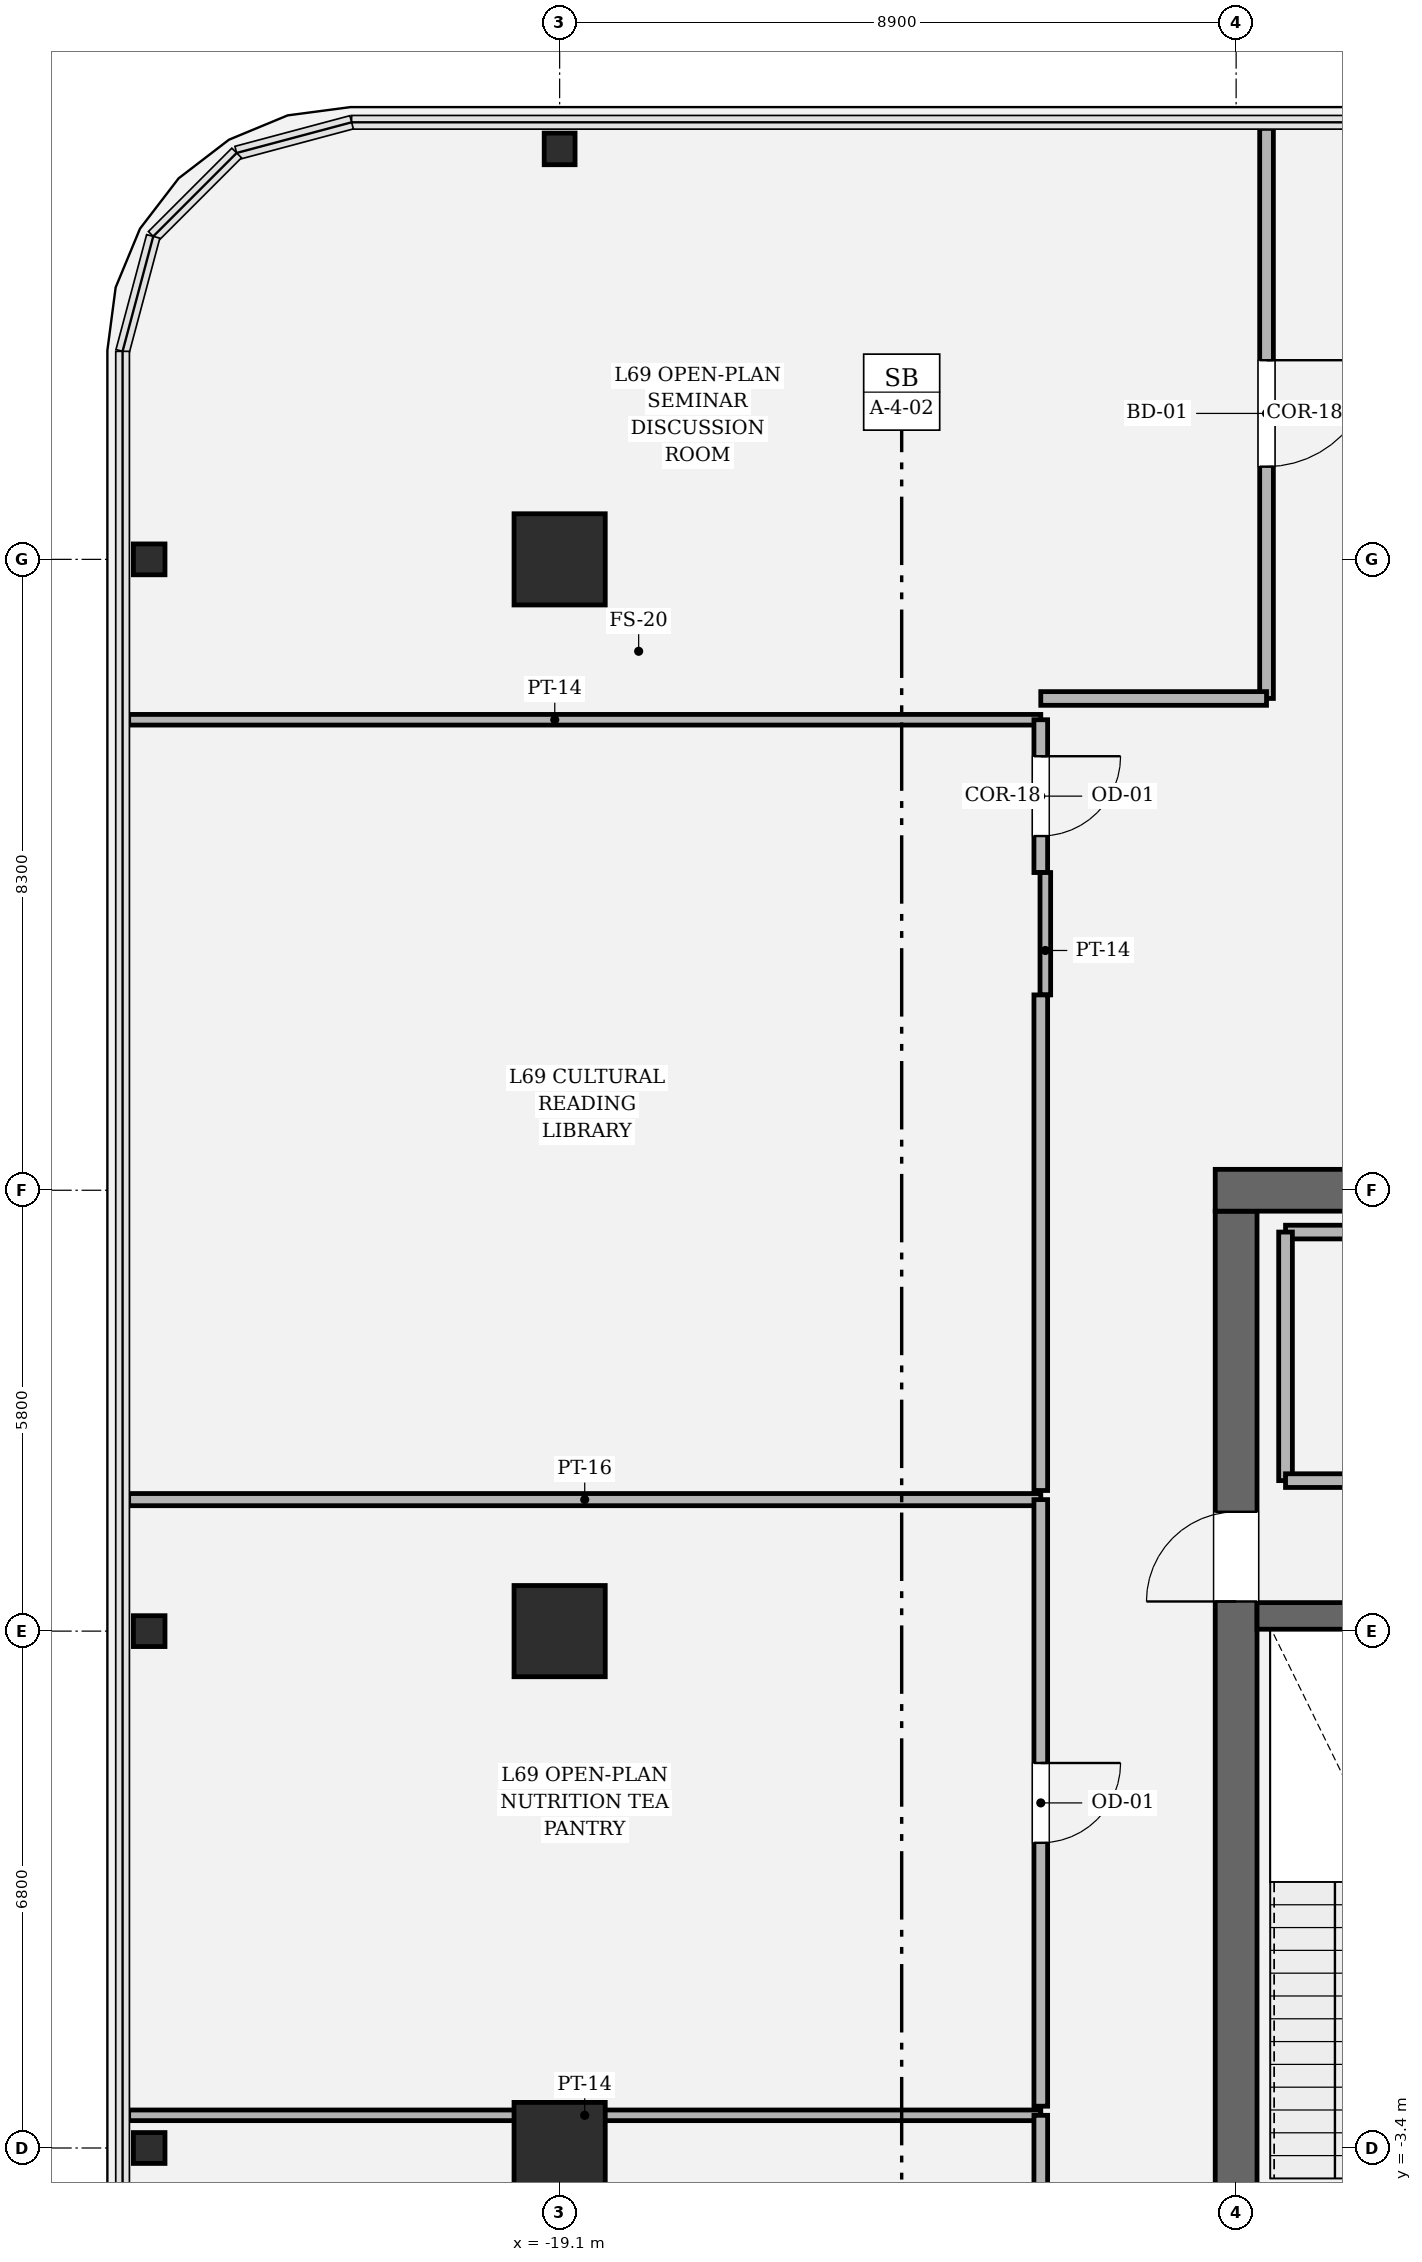
"""IFC4 building model, lengths in metres.
Left out: names, types, materials, properties, quantities, classifications, styles, units other than length and angle.
Written with IfcOpenShell. Run it as: python <this file> out.ifc"""

import sys

from ifc_helpers import new_model, si_unit, direction, frame, frame_2d, origin, origin_2d, place, context, subcontext, project, spatial, rectangle, hollow_rectangle, i_section, extrude, element, fill, save


model = new_model("IFC4")
c1 = context("Model", 3, precision=1e-05, world=origin(), true_north=direction((0.0, 1.0)))
c2 = subcontext(c1, "Body", "Model", "MODEL_VIEW")
j1 = project(units=[si_unit("LENGTHUNIT", "METRE"), si_unit("PLANEANGLEUNIT", "RADIAN")], contexts=[c1])
p1 = place(None, origin())
s1 = spatial("IfcSite", under=j1, at=p1, CompositionType="ELEMENT")
p2 = place(p1, origin())
s2 = spatial("IfcBuilding", under=s1, at=p2, CompositionType="ELEMENT")
p3 = place(p2, frame((0.0, 0.0, 292.2)))
s3 = spatial("IfcBuildingStorey", under=s2, at=p3, CompositionType="ELEMENT", Elevation=292.2)
p4 = place(p3, frame((-10.2, -8.925, 0.0), z_axis=(0.0, 0.0, 1.0), x_axis=(0.0, 1.0, 0.0)))
e1 = element("IfcWall", 1, at=p4, inside=s3, PredefinedType="SHEAR", context=c2, shape_type="SweptSolid", body=[
    extrude(rectangle(XDim=17.85, YDim=0.55, at=frame_2d((8.925, 0.0))), origin(), (0.0, 0.0, 1.0), 4.2),
])
p5 = place(p4, frame((12.715, 0.0, 0.0)))
e2 = element("IfcOpeningElement", 2, at=p5, cuts=e1, PredefinedType="OPENING", context=c2, shape_type="SweptSolid", body=[
    extrude(rectangle(XDim=1.18, YDim=2.2, at=frame_2d((0.59, 1.1))), frame((0.0, 0.285, 0.0), z_axis=(0.0, -1.0, 0.0), x_axis=(1.0, 0.0, 0.0)), (0.0, 0.0, 1.0), 0.57),
])
p6 = place(p3, frame((-10.475, 9.2, 0.0), z_axis=(0.0, 0.0, 1.0), x_axis=(1.0, 0.0, 0.0)))
e3 = element("IfcWall", 3, at=p6, inside=s3, PredefinedType="SHEAR", context=c2, shape_type="SweptSolid", body=[
    extrude(rectangle(XDim=20.95, YDim=0.55, at=frame_2d((10.475, 0.0))), origin(), (0.0, 0.0, 1.0), 4.2),
])
p7 = place(p3, frame((-9.925, 3.6, 0.0), z_axis=(0.0, 0.0, 1.0), x_axis=(1.0, 0.0, 0.0)))
e4 = element("IfcWall", 4, at=p7, inside=s3, PredefinedType="SOLIDWALL", context=c2, shape_type="SweptSolid", body=[
    extrude(rectangle(XDim=5.275, YDim=0.35, at=frame_2d((2.638, 0.0))), origin(), (0.0, 0.0, 1.0), 4.2),
])
for number, where, z_axis, x_axis in (
    (5, (-19.1, 17.5, 0.0), (0.0, 0.0, 1.0), (1.0, 0.0, 0.0)),
    (6, (-19.1, 3.4, 0.0), (0.0, 0.0, 1.0), (1.0, 0.0, 0.0)),
    (7, (-19.1, -3.4, 0.0), (0.0, 0.0, 1.0), (1.0, 0.0, 0.0)),
):
    element("IfcColumn", number, at=place(p3, frame(where, z_axis=z_axis, x_axis=x_axis)), inside=s3, PredefinedType="COLUMN", context=c2, shape_type="SweptSolid", body=[
        extrude(hollow_rectangle(XDim=1.2, YDim=1.2, WallThickness=0.035, at=origin_2d()), origin(), (0.0, 0.0, 1.0), 4.2),
    ])
for number, where, z_axis, x_axis in (
    (8, (-19.1, 22.9, 0.0), (0.0, 0.0, 1.0), (1.0, 0.0, 0.0)),
    (9, (-24.5, -3.4, 0.0), (0.0, 0.0, 1.0), (0.0, 1.0, 0.0)),
    (10, (-24.5, 3.4, 0.0), (0.0, 0.0, 1.0), (0.0, 1.0, 0.0)),
    (11, (-24.5, 17.5, 0.0), (0.0, 0.0, 1.0), (0.0, 1.0, 0.0)),
):
    element("IfcColumn", number, at=place(p3, frame(where, z_axis=z_axis, x_axis=x_axis)), inside=s3, PredefinedType="COLUMN", context=c2, shape_type="SweptSolid", body=[
        extrude(i_section(OverallWidth=0.406, OverallDepth=0.416, WebThickness=0.029, FlangeThickness=0.048, FilletRadius=0.018, at=origin_2d()), origin(), (0.0, 0.0, 1.0), 4.198),
    ])
p8 = place(p3, frame((-5.05, 8.65, 0.0), z_axis=(0.0, 0.0, 1.0), x_axis=(-1.0, 0.0, 0.0)))
e12 = element("IfcWall", 12, at=p8, inside=s3, PredefinedType="PARTITIONING", context=c2, shape_type="SweptSolid", body=[
    extrude(rectangle(XDim=4.5, YDim=0.18, at=frame_2d((2.25, 0.0))), origin(), (0.0, 0.0, 1.0), 4.0),
])
p9 = place(p3, frame((-9.55, 8.65, 0.0), z_axis=(0.0, 0.0, 1.0), x_axis=(0.0, -1.0, 0.0)))
e13 = element("IfcWall", 13, at=p9, inside=s3, PredefinedType="PARTITIONING", context=c2, shape_type="SweptSolid", body=[
    extrude(rectangle(XDim=3.27, YDim=0.18, at=frame_2d((1.635, 0.0))), origin(), (0.0, 0.0, 1.0), 4.0),
])
p10 = place(p3, frame((-9.55, 5.38, 0.0), z_axis=(0.0, 0.0, 1.0), x_axis=(1.0, 0.0, 0.0)))
e14 = element("IfcWall", 14, at=p10, inside=s3, PredefinedType="PARTITIONING", context=c2, shape_type="SweptSolid", body=[
    extrude(rectangle(XDim=4.5, YDim=0.18, at=frame_2d((2.25, 0.0))), origin(), (0.0, 0.0, 1.0), 4.0),
])
p11 = place(p10, frame((1.725, 0.0, 0.0)))
e15 = element("IfcOpeningElement", 15, at=p11, cuts=e14, PredefinedType="OPENING", context=c2, shape_type="SweptSolid", body=[
    extrude(rectangle(XDim=1.05, YDim=2.2, at=frame_2d((0.525, 1.1))), frame((0.0, 0.1, 0.0), z_axis=(0.0, -1.0, 0.0), x_axis=(1.0, 0.0, 0.0)), (0.0, 0.0, 1.0), 0.2),
])
p12 = place(p3, frame((-24.77, -2.97, 0.0), z_axis=(0.0, 0.0, 1.0), x_axis=(1.0, 0.0, 0.0)))
e16 = element("IfcWall", 16, at=p12, inside=s3, PredefinedType="PARTITIONING", context=c2, shape_type="SweptSolid", body=[
    extrude(rectangle(XDim=12.0, YDim=0.14, at=frame_2d((6.0, 0.0))), origin(), (0.0, 0.0, 1.0), 2.714),
])
p13 = place(p3, frame((-12.77, -2.97, 0.0), z_axis=(0.0, 0.0, 1.0), x_axis=(0.0, -1.0, 0.0)))
e17 = element("IfcWall", 17, at=p13, inside=s3, PredefinedType="PARTITIONING", context=c2, shape_type="SweptSolid", body=[
    extrude(rectangle(XDim=8.52, YDim=0.18, at=frame_2d((4.26, 0.0))), origin(), (0.0, 0.0, 1.0), 3.394),
])
p14 = place(p13, frame((3.56, 0.0, 0.0)))
e18 = element("IfcOpeningElement", 18, at=p14, cuts=e17, PredefinedType="OPENING", context=c2, shape_type="SweptSolid", body=[
    extrude(rectangle(XDim=1.4, YDim=2.25, at=frame_2d((0.7, 1.125))), frame((0.0, 0.1, 0.0), z_axis=(0.0, -1.0, 0.0), x_axis=(1.0, 0.0, 0.0)), (0.0, 0.0, 1.0), 0.2),
])
p15 = place(p3, frame((-24.77, 5.13, 0.0), z_axis=(0.0, 0.0, 1.0), x_axis=(1.0, 0.0, 0.0)))
e19 = element("IfcWall", 19, at=p15, inside=s3, PredefinedType="PARTITIONING", context=c2, shape_type="SweptSolid", body=[
    extrude(rectangle(XDim=12.0, YDim=0.16, at=frame_2d((6.0, 0.0))), origin(), (0.0, 0.0, 1.0), 2.714),
])
p16 = place(p3, frame((-12.77, 5.13, 0.0), z_axis=(0.0, 0.0, 1.0), x_axis=(0.0, -1.0, 0.0)))
e20 = element("IfcWall", 20, at=p16, inside=s3, PredefinedType="PARTITIONING", context=c2, shape_type="SweptSolid", body=[
    extrude(rectangle(XDim=7.98, YDim=0.18, at=frame_2d((3.99, 0.0))), origin(), (0.0, 0.0, 1.0), 3.394),
])
p17 = place(p16, frame((3.465, 0.0, 0.0)))
e21 = element("IfcOpeningElement", 21, at=p17, cuts=e20, PredefinedType="OPENING", context=c2, shape_type="SweptSolid", body=[
    extrude(rectangle(XDim=1.05, YDim=2.2, at=frame_2d((0.525, 1.1))), frame((0.0, 0.1, 0.0), z_axis=(0.0, -1.0, 0.0), x_axis=(1.0, 0.0, 0.0)), (0.0, 0.0, 1.0), 0.2),
])
p18 = place(p3, frame((-24.77, 15.39, 0.0), z_axis=(0.0, 0.0, 1.0), x_axis=(1.0, 0.0, 0.0)))
e22 = element("IfcWall", 22, at=p18, inside=s3, PredefinedType="PARTITIONING", context=c2, shape_type="SweptSolid", body=[
    extrude(rectangle(XDim=12.0, YDim=0.14, at=frame_2d((6.0, 0.0))), origin(), (0.0, 0.0, 1.0), 2.714),
])
p19 = place(p3, frame((-12.77, 15.39, 0.0), z_axis=(0.0, 0.0, 1.0), x_axis=(0.0, -1.0, 0.0)))
e23 = element("IfcWall", 23, at=p19, inside=s3, PredefinedType="PARTITIONING", context=c2, shape_type="SweptSolid", body=[
    extrude(rectangle(XDim=2.01, YDim=0.18, at=frame_2d((1.005, 0.0))), origin(), (0.0, 0.0, 1.0), 3.634),
])
p20 = place(p19, frame((0.48, 0.0, 0.0)))
e24 = element("IfcOpeningElement", 24, at=p20, cuts=e23, PredefinedType="OPENING", context=c2, shape_type="SweptSolid", body=[
    extrude(rectangle(XDim=1.05, YDim=2.2, at=frame_2d((0.525, 1.1))), frame((0.0, 0.1, 0.0), z_axis=(0.0, -1.0, 0.0), x_axis=(1.0, 0.0, 0.0)), (0.0, 0.0, 1.0), 0.2),
])
p21 = place(p3, frame((-12.71, 13.38, 0.0), z_axis=(0.0, 0.0, 1.0), x_axis=(0.0, -1.0, 0.0)))
e25 = element("IfcWall", 25, at=p21, inside=s3, PredefinedType="PARTITIONING", context=c2, shape_type="SweptSolid", body=[
    extrude(rectangle(XDim=1.61, YDim=0.14, at=frame_2d((0.805, 0.0))), origin(), (0.0, 0.0, 1.0), 3.634),
])
p22 = place(p3, frame((-12.77, 11.77, 0.0), z_axis=(0.0, 0.0, 1.0), x_axis=(0.0, -1.0, 0.0)))
e26 = element("IfcWall", 26, at=p22, inside=s3, PredefinedType="PARTITIONING", context=c2, shape_type="SweptSolid", body=[
    extrude(rectangle(XDim=6.52, YDim=0.18, at=frame_2d((3.26, 0.0))), origin(), (0.0, 0.0, 1.0), 3.394),
])
p23 = place(p3, frame((-9.8, 23.17, 0.0), z_axis=(0.0, 0.0, 1.0), x_axis=(0.0, -1.0, 0.0)))
e27 = element("IfcWall", 27, at=p23, inside=s3, PredefinedType="PARTITIONING", context=c2, shape_type="SweptSolid", body=[
    extrude(rectangle(XDim=7.5, YDim=0.18, at=frame_2d((3.75, 0.0))), origin(), (0.0, 0.0, 1.0), 2.714),
])
p24 = place(p23, frame((3.05, 0.0, 0.0)))
e28 = element("IfcOpeningElement", 28, at=p24, cuts=e27, PredefinedType="OPENING", context=c2, shape_type="SweptSolid", body=[
    extrude(rectangle(XDim=1.4, YDim=2.25, at=frame_2d((0.7, 1.125))), frame((0.0, 0.1, 0.0), z_axis=(0.0, -1.0, 0.0), x_axis=(1.0, 0.0, 0.0)), (0.0, 0.0, 1.0), 0.2),
])
p25 = place(p3, frame((-9.8, 15.67, 0.0), z_axis=(0.0, 0.0, 1.0), x_axis=(-1.0, 0.0, 0.0)))
e29 = element("IfcWall", 29, at=p25, inside=s3, PredefinedType="PARTITIONING", context=c2, shape_type="SweptSolid", body=[
    extrude(rectangle(XDim=2.97, YDim=0.18, at=frame_2d((1.485, 0.0))), origin(), (0.0, 0.0, 1.0), 3.394),
])
p26 = place(p5, origin())
e30 = element("IfcDoor", 30, at=p26, inside=s3, OperationType="SINGLE_SWING_LEFT", PredefinedType="DOOR", context=c2, shape_type="SweptSolid", body=[
    extrude(rectangle(XDim=1.18, YDim=2.2, at=frame_2d((0.59, 1.1))), frame((0.0, 0.025, 0.0), z_axis=(0.0, -1.0, 0.0), x_axis=(1.0, 0.0, 0.0)), (0.0, 0.0, 1.0), 0.05),
])
fill(e2, e30)
p27 = place(p17, origin())
e31 = element("IfcDoor", 31, at=p27, inside=s3, OperationType="SINGLE_SWING_LEFT", PredefinedType="DOOR", context=c2, shape_type="SweptSolid", body=[
    extrude(rectangle(XDim=1.05, YDim=2.2, at=frame_2d((0.525, 1.1))), frame((0.0, 0.025, 0.0), z_axis=(0.0, -1.0, 0.0), x_axis=(1.0, 0.0, 0.0)), (0.0, 0.0, 1.0), 0.05),
])
fill(e21, e31)
p28 = place(p20, origin())
e32 = element("IfcDoor", 32, at=p28, inside=s3, OperationType="SINGLE_SWING_LEFT", PredefinedType="DOOR", context=c2, shape_type="SweptSolid", body=[
    extrude(rectangle(XDim=1.05, YDim=2.2, at=frame_2d((0.525, 1.1))), frame((0.0, 0.025, 0.0), z_axis=(0.0, -1.0, 0.0), x_axis=(1.0, 0.0, 0.0)), (0.0, 0.0, 1.0), 0.05),
])
fill(e24, e32)
p29 = place(p24, origin())
e33 = element("IfcDoor", 33, at=p29, inside=s3, OperationType="SINGLE_SWING_LEFT", PredefinedType="DOOR", context=c2, shape_type="SweptSolid", body=[
    extrude(rectangle(XDim=1.4, YDim=2.25, at=frame_2d((0.7, 1.125))), frame((0.0, 0.025, 0.0), z_axis=(0.0, -1.0, 0.0), x_axis=(1.0, 0.0, 0.0)), (0.0, 0.0, 1.0), 0.05),
])
fill(e28, e33)
save(model, sys.argv[1])
